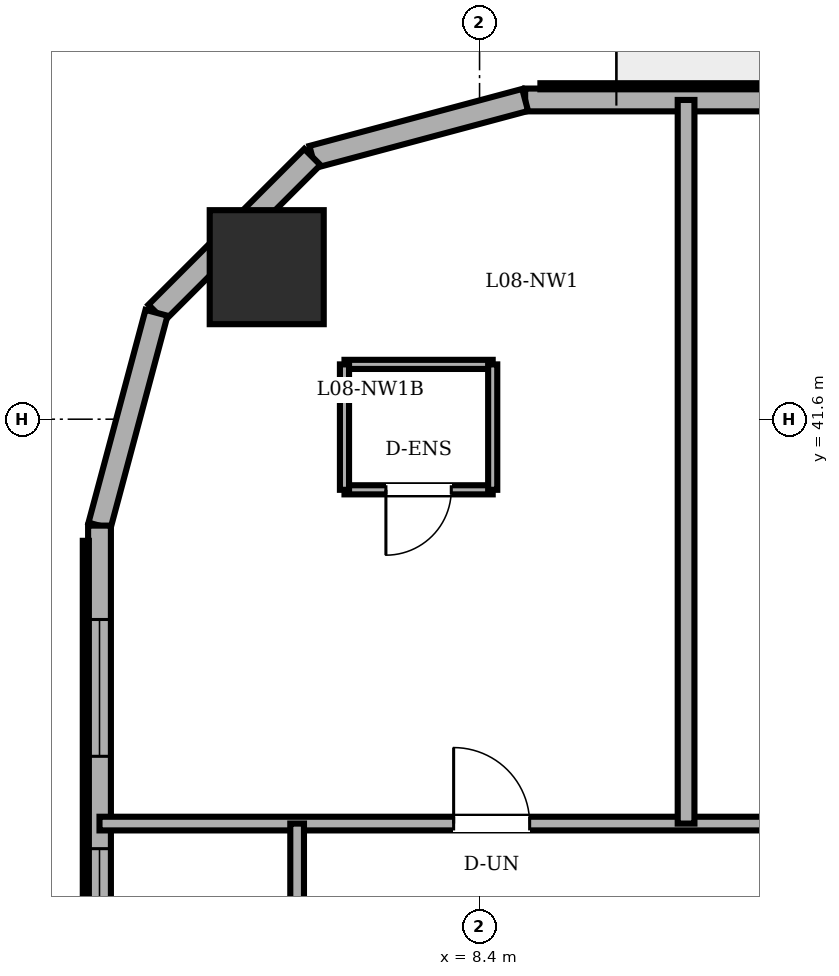
"""IFC4 building model, lengths in metres.
Left out: names, types, materials, properties, quantities, classifications, styles, units other than length and angle.
Written with IfcOpenShell. Run it as: python <this file> out.ifc"""

import sys

from ifc_helpers import new_model, si_unit, direction, frame, frame_2d, origin, origin_2d, place, context, subcontext, project, spatial, rectangle, circle, extrude, element, fill, save


model = new_model("IFC4")
c1 = context("Model", 3, precision=1e-05, world=origin(), true_north=direction((0.0, 1.0)))
c2 = subcontext(c1, "Body", "Model", "MODEL_VIEW")
j1 = project(units=[si_unit("LENGTHUNIT", "METRE"), si_unit("PLANEANGLEUNIT", "RADIAN")], contexts=[c1])
p1 = place(None, origin())
s1 = spatial("IfcSite", under=j1, at=p1, CompositionType="ELEMENT")
p2 = place(p1, origin())
s2 = spatial("IfcBuilding", under=s1, at=p2, CompositionType="ELEMENT")
p3 = place(p2, frame((0.0, 0.0, 32.4)))
s3 = spatial("IfcBuildingStorey", under=s2, at=p3, CompositionType="ELEMENT", Elevation=32.4)
p4 = place(p3, frame((5.6, 43.6, 0.0), z_axis=(0.0, 0.0, 1.0), x_axis=(1.0, 0.0, 0.0)))
e1 = element("IfcColumn", 1, at=p4, inside=s3, PredefinedType="COLUMN", context=c2, shape_type="SweptSolid", body=[
    extrude(circle(Radius=0.75, at=origin_2d()), origin(), (0.0, 0.0, 1.0), 3.6),
])
p5 = place(p3, frame((39.079, 45.8, 0.0), z_axis=(0.0, 0.0, 1.0), x_axis=(-1.0, 0.0, 0.0)))
e2 = element("IfcWall", 2, at=p5, inside=s3, PredefinedType="SOLIDWALL", context=c2, shape_type="SweptSolid", body=[
    extrude(rectangle(XDim=30.079, YDim=0.3, at=frame_2d((15.04, 0.0))), origin(), (0.0, 0.0, 1.0), 3.4),
])
p6 = place(p5, frame((25.279, 0.0, 0.0)))
e3 = element("IfcOpeningElement", 3, at=p6, cuts=e2, PredefinedType="OPENING", context=c2, shape_type="SweptSolid", body=[
    extrude(rectangle(XDim=0.95, YDim=2.2, at=frame_2d((0.475, 1.1))), frame((0.0, 0.16, 0.0), z_axis=(0.0, -1.0, 0.0), x_axis=(1.0, 0.0, 0.0)), (0.0, 0.0, 1.0), 0.32),
])
p7 = place(p5, frame((2.226, 0.0, 0.85)))
e4 = element("IfcOpeningElement", 4, at=p7, cuts=e2, PredefinedType="OPENING", context=c2, shape_type="SweptSolid", body=[
    extrude(rectangle(XDim=1.8, YDim=1.55, at=frame_2d((0.9, 0.775))), frame((0.0, 0.16, 0.0), z_axis=(0.0, -1.0, 0.0), x_axis=(1.0, 0.0, 0.0)), (0.0, 0.0, 1.0), 0.32),
])
p8 = place(p5, frame((5.003, 0.0, 0.85)))
e5 = element("IfcOpeningElement", 5, at=p8, cuts=e2, PredefinedType="OPENING", context=c2, shape_type="SweptSolid", body=[
    extrude(rectangle(XDim=1.8, YDim=1.55, at=frame_2d((0.9, 0.775))), frame((0.0, 0.16, 0.0), z_axis=(0.0, -1.0, 0.0), x_axis=(1.0, 0.0, 0.0)), (0.0, 0.0, 1.0), 0.32),
])
p9 = place(p5, frame((10.179, 0.0, 0.85)))
e6 = element("IfcOpeningElement", 6, at=p9, cuts=e2, PredefinedType="OPENING", context=c2, shape_type="SweptSolid", body=[
    extrude(rectangle(XDim=1.8, YDim=1.55, at=frame_2d((0.9, 0.775))), frame((0.0, 0.16, 0.0), z_axis=(0.0, -1.0, 0.0), x_axis=(1.0, 0.0, 0.0)), (0.0, 0.0, 1.0), 0.32),
])
p10 = place(p5, frame((12.579, 0.0, 0.85)))
e7 = element("IfcOpeningElement", 7, at=p10, cuts=e2, PredefinedType="OPENING", context=c2, shape_type="SweptSolid", body=[
    extrude(rectangle(XDim=1.8, YDim=1.55, at=frame_2d((0.9, 0.775))), frame((0.0, 0.16, 0.0), z_axis=(0.0, -1.0, 0.0), x_axis=(1.0, 0.0, 0.0)), (0.0, 0.0, 1.0), 0.32),
])
p11 = place(p5, frame((19.007, 0.0, 0.85)))
e8 = element("IfcOpeningElement", 8, at=p11, cuts=e2, PredefinedType="OPENING", context=c2, shape_type="SweptSolid", body=[
    extrude(rectangle(XDim=1.8, YDim=1.55, at=frame_2d((0.9, 0.775))), frame((0.0, 0.16, 0.0), z_axis=(0.0, -1.0, 0.0), x_axis=(1.0, 0.0, 0.0)), (0.0, 0.0, 1.0), 0.32),
])
p12 = place(p5, frame((23.034, 0.0, 0.85)))
e9 = element("IfcOpeningElement", 9, at=p12, cuts=e2, PredefinedType="OPENING", context=c2, shape_type="SweptSolid", body=[
    extrude(rectangle(XDim=1.8, YDim=1.55, at=frame_2d((0.9, 0.775))), frame((0.0, 0.16, 0.0), z_axis=(0.0, -1.0, 0.0), x_axis=(1.0, 0.0, 0.0)), (0.0, 0.0, 1.0), 0.32),
])
p13 = place(p3, frame((9.0, 45.8, 0.0), z_axis=(0.0, 0.0, 1.0), x_axis=(-0.96594917914, -0.258731875344, 0.0)))
e10 = element("IfcWall", 10, at=p13, inside=s3, PredefinedType="SOLIDWALL", context=c2, shape_type="SweptSolid", body=[
    extrude(rectangle(XDim=2.899, YDim=0.3, at=frame_2d((1.449, 0.0))), origin(), (0.0, 0.0, 1.0), 3.4),
])
p14 = place(p3, frame((6.2, 45.05, 0.0), z_axis=(0.0, 0.0, 1.0), x_axis=(-0.707106781187, -0.707106781187, 0.0)))
e11 = element("IfcWall", 11, at=p14, inside=s3, PredefinedType="SOLIDWALL", context=c2, shape_type="SweptSolid", body=[
    extrude(rectangle(XDim=2.899, YDim=0.3, at=frame_2d((1.45, 0.0))), origin(), (0.0, 0.0, 1.0), 3.4),
])
p15 = place(p3, frame((4.15, 43.0, 0.0), z_axis=(0.0, 0.0, 1.0), x_axis=(-0.258731875344, -0.96594917914, 0.0)))
e12 = element("IfcWall", 12, at=p15, inside=s3, PredefinedType="SOLIDWALL", context=c2, shape_type="SweptSolid", body=[
    extrude(rectangle(XDim=2.899, YDim=0.3, at=frame_2d((1.449, 0.0))), origin(), (0.0, 0.0, 1.0), 3.4),
])
p16 = place(p3, frame((3.4, 40.2, 0.0), z_axis=(0.0, 0.0, 1.0), x_axis=(0.0, -1.0, 0.0)))
e13 = element("IfcWall", 13, at=p16, inside=s3, PredefinedType="SOLIDWALL", context=c2, shape_type="SweptSolid", body=[
    extrude(rectangle(XDim=32.4, YDim=0.3, at=frame_2d((16.2, 0.0))), origin(), (0.0, 0.0, 1.0), 3.4),
])
p17 = place(p16, frame((1.235, 0.0, 0.85)))
e14 = element("IfcOpeningElement", 14, at=p17, cuts=e13, PredefinedType="OPENING", context=c2, shape_type="SweptSolid", body=[
    extrude(rectangle(XDim=1.8, YDim=1.55, at=frame_2d((0.9, 0.775))), frame((0.0, 0.16, 0.0), z_axis=(0.0, -1.0, 0.0), x_axis=(1.0, 0.0, 0.0)), (0.0, 0.0, 1.0), 0.32),
])
p18 = place(p16, frame((4.25, 0.0, 0.85)))
e15 = element("IfcOpeningElement", 15, at=p18, cuts=e13, PredefinedType="OPENING", context=c2, shape_type="SweptSolid", body=[
    extrude(rectangle(XDim=1.8, YDim=1.55, at=frame_2d((0.9, 0.775))), frame((0.0, 0.16, 0.0), z_axis=(0.0, -1.0, 0.0), x_axis=(1.0, 0.0, 0.0)), (0.0, 0.0, 1.0), 0.32),
])
p19 = place(p16, frame((9.253, 0.0, 0.85)))
e16 = element("IfcOpeningElement", 16, at=p19, cuts=e13, PredefinedType="OPENING", context=c2, shape_type="SweptSolid", body=[
    extrude(rectangle(XDim=1.8, YDim=1.55, at=frame_2d((0.9, 0.775))), frame((0.0, 0.16, 0.0), z_axis=(0.0, -1.0, 0.0), x_axis=(1.0, 0.0, 0.0)), (0.0, 0.0, 1.0), 0.32),
])
p20 = place(p16, frame((13.027, 0.0, 0.85)))
e17 = element("IfcOpeningElement", 17, at=p20, cuts=e13, PredefinedType="OPENING", context=c2, shape_type="SweptSolid", body=[
    extrude(rectangle(XDim=1.8, YDim=1.55, at=frame_2d((0.9, 0.775))), frame((0.0, 0.16, 0.0), z_axis=(0.0, -1.0, 0.0), x_axis=(1.0, 0.0, 0.0)), (0.0, 0.0, 1.0), 0.32),
])
p21 = place(p16, frame((19.573, 0.0, 0.85)))
e18 = element("IfcOpeningElement", 18, at=p21, cuts=e13, PredefinedType="OPENING", context=c2, shape_type="SweptSolid", body=[
    extrude(rectangle(XDim=1.8, YDim=1.55, at=frame_2d((0.9, 0.775))), frame((0.0, 0.16, 0.0), z_axis=(0.0, -1.0, 0.0), x_axis=(1.0, 0.0, 0.0)), (0.0, 0.0, 1.0), 0.32),
])
p22 = place(p16, frame((22.347, 0.0, 0.85)))
e19 = element("IfcOpeningElement", 19, at=p22, cuts=e13, PredefinedType="OPENING", context=c2, shape_type="SweptSolid", body=[
    extrude(rectangle(XDim=1.8, YDim=1.55, at=frame_2d((0.9, 0.775))), frame((0.0, 0.16, 0.0), z_axis=(0.0, -1.0, 0.0), x_axis=(1.0, 0.0, 0.0)), (0.0, 0.0, 1.0), 0.32),
])
p23 = place(p16, frame((26.35, 0.0, 0.85)))
e20 = element("IfcOpeningElement", 20, at=p23, cuts=e13, PredefinedType="OPENING", context=c2, shape_type="SweptSolid", body=[
    extrude(rectangle(XDim=1.8, YDim=1.55, at=frame_2d((0.9, 0.775))), frame((0.0, 0.16, 0.0), z_axis=(0.0, -1.0, 0.0), x_axis=(1.0, 0.0, 0.0)), (0.0, 0.0, 1.0), 0.32),
])
p24 = place(p16, frame((29.365, 0.0, 0.85)))
e21 = element("IfcOpeningElement", 21, at=p24, cuts=e13, PredefinedType="OPENING", context=c2, shape_type="SweptSolid", body=[
    extrude(rectangle(XDim=1.8, YDim=1.55, at=frame_2d((0.9, 0.775))), frame((0.0, 0.16, 0.0), z_axis=(0.0, -1.0, 0.0), x_axis=(1.0, 0.0, 0.0)), (0.0, 0.0, 1.0), 0.32),
])
p25 = place(p3, frame((6.623, 42.321, 0.0), z_axis=(0.0, 0.0, 1.0), x_axis=(1.0, 0.0, 0.0)))
e22 = element("IfcWall", 22, at=p25, inside=s3, PredefinedType="PARTITIONING", context=c2, shape_type="SweptSolid", body=[
    extrude(rectangle(XDim=1.95, YDim=0.12, at=frame_2d((0.975, 0.0))), origin(), (0.0, 0.0, 1.0), 3.4),
])
p26 = place(p3, frame((8.573, 40.671, 0.0), z_axis=(0.0, 0.0, 1.0), x_axis=(-1.0, 0.0, 0.0)))
e23 = element("IfcWall", 23, at=p26, inside=s3, PredefinedType="PARTITIONING", context=c2, shape_type="SweptSolid", body=[
    extrude(rectangle(XDim=1.95, YDim=0.12, at=frame_2d((0.975, 0.0))), origin(), (0.0, 0.0, 1.0), 3.4),
])
p27 = place(p26, frame((0.545, 0.0, 0.0)))
e24 = element("IfcOpeningElement", 24, at=p27, cuts=e23, PredefinedType="OPENING", context=c2, shape_type="SweptSolid", body=[
    extrude(rectangle(XDim=0.86, YDim=2.1, at=frame_2d((0.43, 1.05))), frame((0.0, 0.07, 0.0), z_axis=(0.0, -1.0, 0.0), x_axis=(1.0, 0.0, 0.0)), (0.0, 0.0, 1.0), 0.14),
])
for number, where, z_axis, x_axis in (
    (25, (6.623, 42.321, 0.0), (0.0, 0.0, 1.0), (0.0, -1.0, 0.0)),
    (26, (8.573, 40.671, 0.0), (0.0, 0.0, 1.0), (0.0, 1.0, 0.0)),
):
    element("IfcWall", number, at=place(p3, frame(where, z_axis=z_axis, x_axis=x_axis)), inside=s3, PredefinedType="PARTITIONING", context=c2, shape_type="SweptSolid", body=[
        extrude(rectangle(XDim=1.65, YDim=0.12, at=frame_2d((0.825, 0.0))), origin(), (0.0, 0.0, 1.0), 3.4),
    ])
p28 = place(p3, frame((3.4, 36.28, 0.0), z_axis=(0.0, 0.0, 1.0), x_axis=(1.0, 0.0, 0.0)))
e27 = element("IfcWall", 27, at=p28, inside=s3, PredefinedType="PARTITIONING", context=c2, shape_type="SweptSolid", body=[
    extrude(rectangle(XDim=36.45, YDim=0.18, at=frame_2d((18.225, 0.0))), origin(), (0.0, 0.0, 1.0), 3.4),
])
p29 = place(p28, frame((21.05, 0.0, 0.0)))
e28 = element("IfcOpeningElement", 28, at=p29, cuts=e27, PredefinedType="OPENING", context=c2, shape_type="SweptSolid", body=[
    extrude(rectangle(XDim=0.9, YDim=2.1, at=frame_2d((0.45, 1.05))), frame((0.0, 0.1, 0.0), z_axis=(0.0, -1.0, 0.0), x_axis=(1.0, 0.0, 0.0)), (0.0, 0.0, 1.0), 0.2),
])
p30 = place(p28, frame((24.67, 0.0, 0.0)))
e29 = element("IfcOpeningElement", 29, at=p30, cuts=e27, PredefinedType="OPENING", context=c2, shape_type="SweptSolid", body=[
    extrude(rectangle(XDim=0.86, YDim=2.1, at=frame_2d((0.43, 1.05))), frame((0.0, 0.1, 0.0), z_axis=(0.0, -1.0, 0.0), x_axis=(1.0, 0.0, 0.0)), (0.0, 0.0, 1.0), 0.2),
])
p31 = place(p28, frame((4.659, 0.0, 0.0)))
e30 = element("IfcOpeningElement", 30, at=p31, cuts=e27, PredefinedType="OPENING", context=c2, shape_type="SweptSolid", body=[
    extrude(rectangle(XDim=1.0, YDim=2.15, at=frame_2d((0.5, 1.075))), frame((0.0, 0.1, 0.0), z_axis=(0.0, -1.0, 0.0), x_axis=(1.0, 0.0, 0.0)), (0.0, 0.0, 1.0), 0.2),
])
p32 = place(p28, frame((13.258, 0.0, 0.0)))
e31 = element("IfcOpeningElement", 31, at=p32, cuts=e27, PredefinedType="OPENING", context=c2, shape_type="SweptSolid", body=[
    extrude(rectangle(XDim=1.0, YDim=2.15, at=frame_2d((0.5, 1.075))), frame((0.0, 0.1, 0.0), z_axis=(0.0, -1.0, 0.0), x_axis=(1.0, 0.0, 0.0)), (0.0, 0.0, 1.0), 0.2),
])
p33 = place(p28, frame((30.965, 0.0, 0.0)))
e32 = element("IfcOpeningElement", 32, at=p33, cuts=e27, PredefinedType="OPENING", context=c2, shape_type="SweptSolid", body=[
    extrude(rectangle(XDim=1.0, YDim=2.15, at=frame_2d((0.5, 1.075))), frame((0.0, 0.1, 0.0), z_axis=(0.0, -1.0, 0.0), x_axis=(1.0, 0.0, 0.0)), (0.0, 0.0, 1.0), 0.2),
])
p34 = place(p3, frame((6.0, 33.82, 0.0), z_axis=(0.0, 0.0, 1.0), x_axis=(0.0, 1.0, 0.0)))
e33 = element("IfcWall", 33, at=p34, inside=s3, PredefinedType="PARTITIONING", context=c2, shape_type="SweptSolid", body=[
    extrude(rectangle(XDim=2.46, YDim=0.18, at=frame_2d((1.23, 0.0))), origin(), (0.0, 0.0, 1.0), 3.4),
])
p35 = place(p3, frame((11.117, 36.28, 0.0), z_axis=(0.0, 0.0, 1.0), x_axis=(0.0, 1.0, 0.0)))
e34 = element("IfcWall", 34, at=p35, inside=s3, PredefinedType="PARTITIONING", context=c2, shape_type="SweptSolid", body=[
    extrude(rectangle(XDim=9.52, YDim=0.22, at=frame_2d((4.76, 0.0))), origin(), (0.0, 0.0, 1.0), 3.4),
])
p36 = place(p17, origin())
e35 = element("IfcWindow", 35, at=p36, inside=s3, PartitioningType="DOUBLE_PANEL_VERTICAL", PredefinedType="WINDOW", context=c2, shape_type="SweptSolid", body=[
    extrude(rectangle(XDim=1.8, YDim=1.55, at=frame_2d((0.9, 0.775))), frame((0.0, 0.03, 0.0), z_axis=(0.0, -1.0, 0.0), x_axis=(1.0, 0.0, 0.0)), (0.0, 0.0, 1.0), 0.06),
])
fill(e14, e35)
p37 = place(p18, origin())
e36 = element("IfcWindow", 36, at=p37, inside=s3, PartitioningType="DOUBLE_PANEL_VERTICAL", PredefinedType="WINDOW", context=c2, shape_type="SweptSolid", body=[
    extrude(rectangle(XDim=1.8, YDim=1.55, at=frame_2d((0.9, 0.775))), frame((0.0, 0.03, 0.0), z_axis=(0.0, -1.0, 0.0), x_axis=(1.0, 0.0, 0.0)), (0.0, 0.0, 1.0), 0.06),
])
fill(e15, e36)
p38 = place(p27, origin())
e37 = element("IfcDoor", 37, at=p38, inside=s3, OperationType="SINGLE_SWING_RIGHT", PredefinedType="DOOR", context=c2, shape_type="SweptSolid", body=[
    extrude(rectangle(XDim=0.86, YDim=2.1, at=frame_2d((0.43, 1.05))), frame((0.0, 0.025, 0.0), z_axis=(0.0, -1.0, 0.0), x_axis=(1.0, 0.0, 0.0)), (0.0, 0.0, 1.0), 0.05),
])
fill(e24, e37)
p39 = place(p31, origin())
e38 = element("IfcDoor", 38, at=p39, inside=s3, OperationType="SINGLE_SWING_LEFT", PredefinedType="DOOR", context=c2, shape_type="SweptSolid", body=[
    extrude(rectangle(XDim=1.0, YDim=2.15, at=frame_2d((0.5, 1.075))), frame((0.0, 0.025, 0.0), z_axis=(0.0, -1.0, 0.0), x_axis=(1.0, 0.0, 0.0)), (0.0, 0.0, 1.0), 0.05),
])
fill(e30, e38)
save(model, sys.argv[1])
